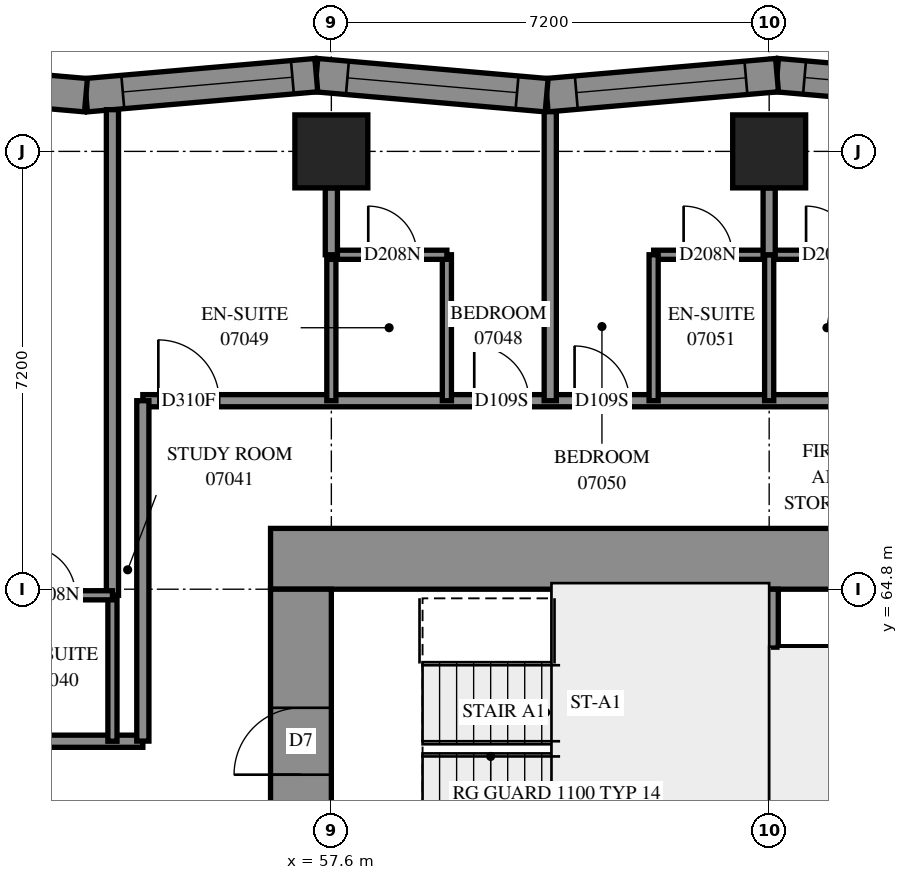
"""IFC4 building model, lengths in metres.
Left out: names, types, materials, properties, quantities, classifications, styles, units other than length and angle.
Written with IfcOpenShell. Run it as: python <this file> out.ifc"""

import sys

from ifc_helpers import new_model, si_unit, direction, frame, frame_2d, origin, origin_2d, place, context, subcontext, project, spatial, polyline, rectangle, outline, extrude, element, fill, save


model = new_model("IFC4")
c1 = context("Model", 3, precision=1e-05, world=origin(), true_north=direction((0.0, 1.0)))
c2 = subcontext(c1, "Body", "Model", "MODEL_VIEW")
j1 = project(units=[si_unit("LENGTHUNIT", "METRE"), si_unit("PLANEANGLEUNIT", "RADIAN")], contexts=[c1])
p1 = place(None, origin())
s1 = spatial("IfcSite", under=j1, at=p1, CompositionType="ELEMENT")
p2 = place(p1, origin())
s2 = spatial("IfcBuilding", under=s1, at=p2, CompositionType="ELEMENT")
p3 = place(p2, frame((0.0, 0.0, 30.4)))
s3 = spatial("IfcBuildingStorey", under=s2, at=p3, CompositionType="ELEMENT", Elevation=30.4)
for number, where, z_axis, x_axis in (
    (1, (57.6, 72.0, 0.0), (0.0, 0.0, 1.0), (1.0, 0.0, 0.0)),
    (2, (64.8, 72.0, 0.0), (0.0, 0.0, 1.0), (1.0, 0.0, 0.0)),
):
    element("IfcColumn", number, at=place(p3, frame(where, z_axis=z_axis, x_axis=x_axis)), inside=s3, PredefinedType="COLUMN", context=c2, shape_type="SweptSolid", body=[
        extrude(rectangle(XDim=1.2, YDim=1.2, at=origin_2d()), origin(), (0.0, 0.0, 1.0), 3.1),
    ])
p4 = place(p3, frame((56.6, 65.3, -0.3), z_axis=(0.0, 0.0, 1.0), x_axis=(1.0, 0.0, 0.0)))
e3 = element("IfcWall", 3, at=p4, inside=s3, PredefinedType="SHEAR", context=c2, shape_type="SweptSolid", body=[
    extrude(rectangle(XDim=16.4, YDim=1.0, at=frame_2d((8.2, 0.0))), origin(), (0.0, 0.0, 1.0), 2.7),
])
p5 = place(p4, frame((11.0, 0.0, 0.3)))
e4 = element("IfcOpeningElement", 4, at=p5, cuts=e3, PredefinedType="OPENING", context=c2, shape_type="SweptSolid", body=[
    extrude(rectangle(XDim=0.8, YDim=2.1, at=frame_2d((0.4, 1.05))), frame((0.0, 0.51, 0.0), z_axis=(0.0, -1.0, 0.0), x_axis=(1.0, 0.0, 0.0)), (0.0, 0.0, 1.0), 1.02),
])
p6 = place(p3, frame((57.1, 50.4, -0.3), z_axis=(0.0, 0.0, 1.0), x_axis=(0.0, 1.0, 0.0)))
e5 = element("IfcWall", 5, at=p6, inside=s3, PredefinedType="SHEAR", context=c2, shape_type="SweptSolid", body=[
    extrude(rectangle(XDim=14.4, YDim=1.0, at=frame_2d((7.2, 0.0))), origin(), (0.0, 0.0, 1.0), 2.7),
])
p7 = place(p6, frame((4.55, 0.0, 0.3)))
e6 = element("IfcOpeningElement", 6, at=p7, cuts=e5, PredefinedType="OPENING", context=c2, shape_type="SweptSolid", body=[
    extrude(rectangle(XDim=1.1, YDim=2.1, at=frame_2d((0.55, 1.05))), frame((0.0, 0.51, 0.0), z_axis=(0.0, -1.0, 0.0), x_axis=(1.0, 0.0, 0.0)), (0.0, 0.0, 1.0), 1.02),
])
p8 = place(p6, frame((11.35, 0.0, 0.3)))
e7 = element("IfcOpeningElement", 7, at=p8, cuts=e5, PredefinedType="OPENING", context=c2, shape_type="SweptSolid", body=[
    extrude(rectangle(XDim=1.1, YDim=2.1, at=frame_2d((0.55, 1.05))), frame((0.0, 0.51, 0.0), z_axis=(0.0, -1.0, 0.0), x_axis=(1.0, 0.0, 0.0)), (0.0, 0.0, 1.0), 1.02),
])
p9 = place(p3, frame((64.8, 60.6, 0.0), z_axis=(0.0, 0.0, 1.0), x_axis=(0.0, 1.0, 0.0)))
e8 = element("IfcWall", 8, at=p9, inside=s3, PredefinedType="SOLIDWALL", context=c2, shape_type="SweptSolid", body=[
    extrude(rectangle(XDim=4.2, YDim=0.3, at=frame_2d((2.1, 0.0))), origin(), (0.0, 0.0, 1.0), 3.1),
])
p10 = place(p3, frame((68.718, 72.924, 0.0), z_axis=(0.0, 0.0, 1.0), x_axis=(-0.9962273538, 0.0867816769, 0.0)))
e9 = element("IfcWall", 9, at=p10, inside=s3, PredefinedType="SOLIDWALL", context=c2, shape_type="SweptSolid", body=[
    extrude(outline(polyline([(0.024, -0.275), (3.827, -0.275), (3.779, 0.275), (-0.024, 0.275), (0.024, -0.275)])), origin(), (0.0, 0.0, 1.0), 3.1),
])
p11 = place(p10, frame((0.549, 0.0, 0.5)))
e10 = element("IfcOpeningElement", 10, at=p11, cuts=e9, PredefinedType="OPENING", context=c2, shape_type="SweptSolid", body=[
    extrude(rectangle(XDim=2.8, YDim=2.45, at=frame_2d((1.4, 1.225))), frame((0.0, 0.285, 0.0), z_axis=(0.0, -1.0, 0.0), x_axis=(1.0, 0.0, 0.0)), (0.0, 0.0, 1.0), 0.57),
])
p12 = place(p3, frame((64.929, 73.254, 0.0), z_axis=(0.0, 0.0, 1.0), x_axis=(-0.9962271558, -0.0867839505, 0.0)))
e11 = element("IfcWall", 11, at=p12, inside=s3, PredefinedType="SOLIDWALL", context=c2, shape_type="SweptSolid", body=[
    extrude(outline(polyline([(-0.024, -0.275), (3.779, -0.275), (3.827, 0.275), (0.024, 0.275), (-0.024, -0.275)])), origin(), (0.0, 0.0, 1.0), 3.1),
])
p13 = place(p12, frame((0.513, 0.0, 0.5)))
e12 = element("IfcOpeningElement", 12, at=p13, cuts=e11, PredefinedType="OPENING", context=c2, shape_type="SweptSolid", body=[
    extrude(rectangle(XDim=2.8, YDim=2.45, at=frame_2d((1.4, 1.225))), frame((0.0, 0.285, 0.0), z_axis=(0.0, -1.0, 0.0), x_axis=(1.0, 0.0, 0.0)), (0.0, 0.0, 1.0), 0.57),
])
p14 = place(p3, frame((61.141, 72.924, 0.0), z_axis=(0.0, 0.0, 1.0), x_axis=(-0.9962273538, 0.0867816769, 0.0)))
e13 = element("IfcWall", 13, at=p14, inside=s3, PredefinedType="SOLIDWALL", context=c2, shape_type="SweptSolid", body=[
    extrude(outline(polyline([(0.024, -0.275), (3.827, -0.275), (3.779, 0.275), (-0.024, 0.275), (0.024, -0.275)])), origin(), (0.0, 0.0, 1.0), 3.1),
])
p15 = place(p14, frame((0.489, 0.0, 0.5)))
e14 = element("IfcOpeningElement", 14, at=p15, cuts=e13, PredefinedType="OPENING", context=c2, shape_type="SweptSolid", body=[
    extrude(rectangle(XDim=2.8, YDim=2.45, at=frame_2d((1.4, 1.225))), frame((0.0, 0.285, 0.0), z_axis=(0.0, -1.0, 0.0), x_axis=(1.0, 0.0, 0.0)), (0.0, 0.0, 1.0), 0.57),
])
p16 = place(p3, frame((57.353, 73.254, 0.0), z_axis=(0.0, 0.0, 1.0), x_axis=(-0.9962273538, -0.0867816769, 0.0)))
e15 = element("IfcWall", 15, at=p16, inside=s3, PredefinedType="SOLIDWALL", context=c2, shape_type="SweptSolid", body=[
    extrude(outline(polyline([(-0.024, -0.275), (3.779, -0.275), (3.827, 0.275), (0.024, 0.275), (-0.024, -0.275)])), origin(), (0.0, 0.0, 1.0), 3.1),
])
p17 = place(p16, frame((0.395, 0.0, 0.5)))
e16 = element("IfcOpeningElement", 16, at=p17, cuts=e15, PredefinedType="OPENING", context=c2, shape_type="SweptSolid", body=[
    extrude(rectangle(XDim=2.8, YDim=2.45, at=frame_2d((1.4, 1.225))), frame((0.0, 0.285, 0.0), z_axis=(0.0, -1.0, 0.0), x_axis=(1.0, 0.0, 0.0)), (0.0, 0.0, 1.0), 0.57),
])
p18 = place(p3, frame((53.564, 72.924, 0.0), z_axis=(0.0, 0.0, 1.0), x_axis=(-0.9962271558, 0.0867839505, 0.0)))
e17 = element("IfcWall", 17, at=p18, inside=s3, PredefinedType="SOLIDWALL", context=c2, shape_type="SweptSolid", body=[
    extrude(outline(polyline([(0.024, -0.275), (3.827, -0.275), (3.779, 0.275), (-0.024, 0.275), (0.024, -0.275)])), origin(), (0.0, 0.0, 1.0), 3.1),
])
p19 = place(p18, frame((1.088, 0.0, 0.5)))
e18 = element("IfcOpeningElement", 18, at=p19, cuts=e17, PredefinedType="OPENING", context=c2, shape_type="SweptSolid", body=[
    extrude(rectangle(XDim=1.2, YDim=2.45, at=frame_2d((0.6, 1.225))), frame((0.0, 0.285, 0.0), z_axis=(0.0, -1.0, 0.0), x_axis=(1.0, 0.0, 0.0)), (0.0, 0.0, 1.0), 0.57),
])
p20 = place(p3, frame((64.95, 63.78, 0.0), z_axis=(0.0, 0.0, 1.0), x_axis=(1.0, 0.0, 0.0)))
e19 = element("IfcWall", 19, at=p20, inside=s3, PredefinedType="PARTITIONING", context=c2, shape_type="SweptSolid", body=[
    extrude(rectangle(XDim=6.25, YDim=0.15, at=frame_2d((3.125, 0.0))), origin(), (0.0, 0.0, 1.0), 3.1),
])
p21 = place(p3, frame((33.502, 62.3, 0.0), z_axis=(0.0, 0.0, 1.0), x_axis=(1.0, 0.0, 0.0)))
e20 = element("IfcWall", 20, at=p21, inside=s3, PredefinedType="PARTITIONING", context=c2, shape_type="SweptSolid", body=[
    extrude(rectangle(XDim=20.998, YDim=0.2, at=frame_2d((10.499, 0.0))), origin(), (0.0, 0.0, 1.0), 3.1),
])
p22 = place(p21, frame((2.898, 0.0, 0.0)))
e21 = element("IfcOpeningElement", 21, at=p22, cuts=e20, PredefinedType="OPENING", context=c2, shape_type="SweptSolid", body=[
    extrude(rectangle(XDim=0.9, YDim=2.1, at=frame_2d((0.45, 1.05))), frame((0.0, 0.11, 0.0), z_axis=(0.0, -1.0, 0.0), x_axis=(1.0, 0.0, 0.0)), (0.0, 0.0, 1.0), 0.22),
])
p23 = place(p21, frame((8.448, 0.0, 0.0)))
e22 = element("IfcOpeningElement", 22, at=p23, cuts=e20, PredefinedType="OPENING", context=c2, shape_type="SweptSolid", body=[
    extrude(rectangle(XDim=0.9, YDim=2.1, at=frame_2d((0.45, 1.05))), frame((0.0, 0.11, 0.0), z_axis=(0.0, -1.0, 0.0), x_axis=(1.0, 0.0, 0.0)), (0.0, 0.0, 1.0), 0.22),
])
p24 = place(p21, frame((10.098, 0.0, 0.0)))
e23 = element("IfcOpeningElement", 23, at=p24, cuts=e20, PredefinedType="OPENING", context=c2, shape_type="SweptSolid", body=[
    extrude(rectangle(XDim=0.9, YDim=2.1, at=frame_2d((0.45, 1.05))), frame((0.0, 0.11, 0.0), z_axis=(0.0, -1.0, 0.0), x_axis=(1.0, 0.0, 0.0)), (0.0, 0.0, 1.0), 0.22),
])
p25 = place(p21, frame((15.648, 0.0, 0.0)))
e24 = element("IfcOpeningElement", 24, at=p25, cuts=e20, PredefinedType="OPENING", context=c2, shape_type="SweptSolid", body=[
    extrude(rectangle(XDim=0.9, YDim=2.1, at=frame_2d((0.45, 1.05))), frame((0.0, 0.11, 0.0), z_axis=(0.0, -1.0, 0.0), x_axis=(1.0, 0.0, 0.0)), (0.0, 0.0, 1.0), 0.22),
])
p26 = place(p21, frame((17.298, 0.0, 0.0)))
e25 = element("IfcOpeningElement", 25, at=p26, cuts=e20, PredefinedType="OPENING", context=c2, shape_type="SweptSolid", body=[
    extrude(rectangle(XDim=0.9, YDim=2.1, at=frame_2d((0.45, 1.05))), frame((0.0, 0.11, 0.0), z_axis=(0.0, -1.0, 0.0), x_axis=(1.0, 0.0, 0.0)), (0.0, 0.0, 1.0), 0.22),
])
p27 = place(p3, frame((54.5, 67.9, 0.0), z_axis=(0.0, 0.0, 1.0), x_axis=(1.0, 0.0, 0.0)))
e26 = element("IfcWall", 26, at=p27, inside=s3, PredefinedType="PARTITIONING", context=c2, shape_type="SweptSolid", body=[
    extrude(rectangle(XDim=20.6, YDim=0.2, at=frame_2d((10.3, 0.0))), origin(), (0.0, 0.0, 1.0), 3.1),
])
p28 = place(p27, frame((0.255, 0.0, 0.0)))
e27 = element("IfcOpeningElement", 27, at=p28, cuts=e26, PredefinedType="OPENING", context=c2, shape_type="SweptSolid", body=[
    extrude(rectangle(XDim=1.0, YDim=2.1, at=frame_2d((0.5, 1.05))), frame((0.0, 0.11, 0.0), z_axis=(0.0, -1.0, 0.0), x_axis=(1.0, 0.0, 0.0)), (0.0, 0.0, 1.0), 0.22),
])
p29 = place(p27, frame((19.345, 0.0, 0.0)))
e28 = element("IfcOpeningElement", 28, at=p29, cuts=e26, PredefinedType="OPENING", context=c2, shape_type="SweptSolid", body=[
    extrude(rectangle(XDim=1.0, YDim=2.1, at=frame_2d((0.5, 1.05))), frame((0.0, 0.11, 0.0), z_axis=(0.0, -1.0, 0.0), x_axis=(1.0, 0.0, 0.0)), (0.0, 0.0, 1.0), 0.22),
])
p30 = place(p27, frame((5.45, 0.0, 0.0)))
e29 = element("IfcOpeningElement", 29, at=p30, cuts=e26, PredefinedType="OPENING", context=c2, shape_type="SweptSolid", body=[
    extrude(rectangle(XDim=0.9, YDim=2.1, at=frame_2d((0.45, 1.05))), frame((0.0, 0.11, 0.0), z_axis=(0.0, -1.0, 0.0), x_axis=(1.0, 0.0, 0.0)), (0.0, 0.0, 1.0), 0.22),
])
p31 = place(p27, frame((7.1, 0.0, 0.0)))
e30 = element("IfcOpeningElement", 30, at=p31, cuts=e26, PredefinedType="OPENING", context=c2, shape_type="SweptSolid", body=[
    extrude(rectangle(XDim=0.9, YDim=2.1, at=frame_2d((0.45, 1.05))), frame((0.0, 0.11, 0.0), z_axis=(0.0, -1.0, 0.0), x_axis=(1.0, 0.0, 0.0)), (0.0, 0.0, 1.0), 0.22),
])
p32 = place(p27, frame((12.65, 0.0, 0.0)))
e31 = element("IfcOpeningElement", 31, at=p32, cuts=e26, PredefinedType="OPENING", context=c2, shape_type="SweptSolid", body=[
    extrude(rectangle(XDim=0.9, YDim=2.1, at=frame_2d((0.45, 1.05))), frame((0.0, 0.11, 0.0), z_axis=(0.0, -1.0, 0.0), x_axis=(1.0, 0.0, 0.0)), (0.0, 0.0, 1.0), 0.22),
])
p33 = place(p27, frame((14.3, 0.0, 0.0)))
e32 = element("IfcOpeningElement", 32, at=p33, cuts=e26, PredefinedType="OPENING", context=c2, shape_type="SweptSolid", body=[
    extrude(rectangle(XDim=0.9, YDim=2.1, at=frame_2d((0.45, 1.05))), frame((0.0, 0.11, 0.0), z_axis=(0.0, -1.0, 0.0), x_axis=(1.0, 0.0, 0.0)), (0.0, 0.0, 1.0), 0.22),
])
p34 = place(p3, frame((54.0, 64.7, 0.0), z_axis=(0.0, 0.0, 1.0), x_axis=(0.0, 1.0, 0.0)))
e33 = element("IfcWall", 33, at=p34, inside=s3, PredefinedType="PARTITIONING", context=c2, shape_type="SweptSolid", body=[
    extrude(rectangle(XDim=7.986, YDim=0.2, at=frame_2d((3.993, 0.0))), origin(), (0.0, 0.0, 1.0), 3.1),
])
p35 = place(p3, frame((54.5, 62.302, 0.0), z_axis=(0.0, 0.0, 1.0), x_axis=(0.0, 1.0, 0.0)))
e34 = element("IfcWall", 34, at=p35, inside=s3, PredefinedType="PARTITIONING", context=c2, shape_type="SweptSolid", body=[
    extrude(rectangle(XDim=5.598, YDim=0.2, at=frame_2d((2.799, 0.0))), origin(), (0.0, 0.0, 1.0), 3.1),
])
p36 = place(p3, frame((61.2, 67.9, 0.0), z_axis=(0.0, 0.0, 1.0), x_axis=(0.0, 1.0, 0.0)))
e35 = element("IfcWall", 35, at=p36, inside=s3, PredefinedType="PARTITIONING", context=c2, shape_type="SweptSolid", body=[
    extrude(rectangle(XDim=4.753, YDim=0.2, at=frame_2d((2.377, 0.0))), origin(), (0.0, 0.0, 1.0), 3.1),
])
p37 = place(p3, frame((62.9, 70.3, 0.0), z_axis=(0.0, 0.0, 1.0), x_axis=(1.0, 0.0, 0.0)))
e36 = element("IfcWall", 36, at=p37, inside=s3, PredefinedType="PARTITIONING", context=c2, shape_type="SweptSolid", body=[
    extrude(rectangle(XDim=3.8, YDim=0.15, at=frame_2d((1.9, 0.0))), origin(), (0.0, 0.0, 1.0), 3.1),
])
p38 = place(p37, frame((0.493, 0.0, 0.0)))
e37 = element("IfcOpeningElement", 37, at=p38, cuts=e36, PredefinedType="OPENING", context=c2, shape_type="SweptSolid", body=[
    extrude(rectangle(XDim=0.8, YDim=2.1, at=frame_2d((0.4, 1.05))), frame((0.0, 0.085, 0.0), z_axis=(0.0, -1.0, 0.0), x_axis=(1.0, 0.0, 0.0)), (0.0, 0.0, 1.0), 0.17),
])
p39 = place(p37, frame((2.507, 0.0, 0.0)))
e38 = element("IfcOpeningElement", 38, at=p39, cuts=e36, PredefinedType="OPENING", context=c2, shape_type="SweptSolid", body=[
    extrude(rectangle(XDim=0.8, YDim=2.1, at=frame_2d((0.4, 1.05))), frame((0.0, 0.085, 0.0), z_axis=(0.0, -1.0, 0.0), x_axis=(1.0, 0.0, 0.0)), (0.0, 0.0, 1.0), 0.17),
])
for number, where, z_axis, x_axis in (
    (39, (54.0, 62.3, 0.0), (0.0, 0.0, 1.0), (0.0, 1.0, 0.0)),
    (40, (59.5, 67.9, 0.0), (0.0, 0.0, 1.0), (0.0, 1.0, 0.0)),
    (41, (57.6, 67.9, 0.0), (0.0, 0.0, 1.0), (0.0, 1.0, 0.0)),
    (42, (62.9, 67.9, 0.0), (0.0, 0.0, 1.0), (0.0, 1.0, 0.0)),
    (43, (64.8, 67.9, 0.0), (0.0, 0.0, 1.0), (0.0, 1.0, 0.0)),
):
    element("IfcWall", number, at=place(p3, frame(where, z_axis=z_axis, x_axis=x_axis)), inside=s3, PredefinedType="PARTITIONING", context=c2, shape_type="SweptSolid", body=[
        extrude(rectangle(XDim=2.4, YDim=0.15, at=frame_2d((1.2, 0.0))), origin(), (0.0, 0.0, 1.0), 3.1),
    ])
p40 = place(p3, frame((52.1, 64.7, 0.0), z_axis=(0.0, 0.0, 1.0), x_axis=(1.0, 0.0, 0.0)))
e44 = element("IfcWall", 44, at=p40, inside=s3, PredefinedType="PARTITIONING", context=c2, shape_type="SweptSolid", body=[
    extrude(rectangle(XDim=1.9, YDim=0.15, at=frame_2d((0.95, 0.0))), origin(), (0.0, 0.0, 1.0), 3.1),
])
p41 = place(p40, frame((0.493, 0.0, 0.0)))
e45 = element("IfcOpeningElement", 45, at=p41, cuts=e44, PredefinedType="OPENING", context=c2, shape_type="SweptSolid", body=[
    extrude(rectangle(XDim=0.8, YDim=2.1, at=frame_2d((0.4, 1.05))), frame((0.0, 0.085, 0.0), z_axis=(0.0, -1.0, 0.0), x_axis=(1.0, 0.0, 0.0)), (0.0, 0.0, 1.0), 0.17),
])
p42 = place(p3, frame((57.6, 70.3, 0.0), z_axis=(0.0, 0.0, 1.0), x_axis=(1.0, 0.0, 0.0)))
e46 = element("IfcWall", 46, at=p42, inside=s3, PredefinedType="PARTITIONING", context=c2, shape_type="SweptSolid", body=[
    extrude(rectangle(XDim=1.9, YDim=0.15, at=frame_2d((0.95, 0.0))), origin(), (0.0, 0.0, 1.0), 3.1),
])
p43 = place(p42, frame((0.607, 0.0, 0.0)))
e47 = element("IfcOpeningElement", 47, at=p43, cuts=e46, PredefinedType="OPENING", context=c2, shape_type="SweptSolid", body=[
    extrude(rectangle(XDim=0.8, YDim=2.1, at=frame_2d((0.4, 1.05))), frame((0.0, 0.085, 0.0), z_axis=(0.0, -1.0, 0.0), x_axis=(1.0, 0.0, 0.0)), (0.0, 0.0, 1.0), 0.17),
])
for number, where, z_axis, x_axis in (
    (48, (57.6, 70.3, 0.0), (0.0, 0.0, 1.0), (0.0, 1.0, 0.0)),
    (49, (64.8, 70.3, 0.0), (0.0, 0.0, 1.0), (0.0, 1.0, 0.0)),
):
    element("IfcWall", number, at=place(p3, frame(where, z_axis=z_axis, x_axis=x_axis)), inside=s3, PredefinedType="PARTITIONING", context=c2, shape_type="SweptSolid", body=[
        extrude(rectangle(XDim=1.1, YDim=0.2, at=frame_2d((0.55, 0.0))), origin(), (0.0, 0.0, 1.0), 3.1),
    ])
p44 = place(p11, origin())
e50 = element("IfcWindow", 50, at=p44, inside=s3, PartitioningType="SINGLE_PANEL", PredefinedType="WINDOW", context=c2, shape_type="SweptSolid", body=[
    extrude(rectangle(XDim=2.8, YDim=2.45, at=frame_2d((1.4, 1.225))), frame((0.0, 0.155, 0.0), z_axis=(0.0, -1.0, 0.0), x_axis=(1.0, 0.0, 0.0)), (0.0, 0.0, 1.0), 0.06),
])
fill(e10, e50)
p45 = place(p13, origin())
e51 = element("IfcWindow", 51, at=p45, inside=s3, PartitioningType="SINGLE_PANEL", PredefinedType="WINDOW", context=c2, shape_type="SweptSolid", body=[
    extrude(rectangle(XDim=2.8, YDim=2.45, at=frame_2d((1.4, 1.225))), frame((0.0, 0.155, 0.0), z_axis=(0.0, -1.0, 0.0), x_axis=(1.0, 0.0, 0.0)), (0.0, 0.0, 1.0), 0.06),
])
fill(e12, e51)
p46 = place(p15, origin())
e52 = element("IfcWindow", 52, at=p46, inside=s3, PartitioningType="SINGLE_PANEL", PredefinedType="WINDOW", context=c2, shape_type="SweptSolid", body=[
    extrude(rectangle(XDim=2.8, YDim=2.45, at=frame_2d((1.4, 1.225))), frame((0.0, 0.155, 0.0), z_axis=(0.0, -1.0, 0.0), x_axis=(1.0, 0.0, 0.0)), (0.0, 0.0, 1.0), 0.06),
])
fill(e14, e52)
p47 = place(p17, origin())
e53 = element("IfcWindow", 53, at=p47, inside=s3, PartitioningType="SINGLE_PANEL", PredefinedType="WINDOW", context=c2, shape_type="SweptSolid", body=[
    extrude(rectangle(XDim=2.8, YDim=2.45, at=frame_2d((1.4, 1.225))), frame((0.0, 0.155, 0.0), z_axis=(0.0, -1.0, 0.0), x_axis=(1.0, 0.0, 0.0)), (0.0, 0.0, 1.0), 0.06),
])
fill(e16, e53)
p48 = place(p8, origin())
e54 = element("IfcDoor", 54, at=p48, inside=s3, OperationType="SINGLE_SWING_LEFT", PredefinedType="DOOR", context=c2, shape_type="SweptSolid", body=[
    extrude(rectangle(XDim=1.1, YDim=2.1, at=frame_2d((0.55, 1.05))), frame((0.0, 0.025, 0.0), z_axis=(0.0, -1.0, 0.0), x_axis=(1.0, 0.0, 0.0)), (0.0, 0.0, 1.0), 0.05),
])
fill(e7, e54)
p49 = place(p41, origin())
e55 = element("IfcDoor", 55, at=p49, inside=s3, OperationType="SINGLE_SWING_RIGHT", PredefinedType="DOOR", context=c2, shape_type="SweptSolid", body=[
    extrude(rectangle(XDim=0.8, YDim=2.1, at=frame_2d((0.4, 1.05))), frame((0.0, 0.025, 0.0), z_axis=(0.0, -1.0, 0.0), x_axis=(1.0, 0.0, 0.0)), (0.0, 0.0, 1.0), 0.05),
])
fill(e45, e55)
p50 = place(p28, origin())
e56 = element("IfcDoor", 56, at=p50, inside=s3, OperationType="SINGLE_SWING_LEFT", PredefinedType="DOOR", context=c2, shape_type="SweptSolid", body=[
    extrude(rectangle(XDim=1.0, YDim=2.1, at=frame_2d((0.5, 1.05))), frame((0.0, 0.025, 0.0), z_axis=(0.0, -1.0, 0.0), x_axis=(1.0, 0.0, 0.0)), (0.0, 0.0, 1.0), 0.05),
])
fill(e27, e56)
p51 = place(p30, origin())
e57 = element("IfcDoor", 57, at=p51, inside=s3, OperationType="SINGLE_SWING_RIGHT", PredefinedType="DOOR", context=c2, shape_type="SweptSolid", body=[
    extrude(rectangle(XDim=0.9, YDim=2.1, at=frame_2d((0.45, 1.05))), frame((0.0, 0.025, 0.0), z_axis=(0.0, -1.0, 0.0), x_axis=(1.0, 0.0, 0.0)), (0.0, 0.0, 1.0), 0.05),
])
fill(e29, e57)
p52 = place(p43, origin())
e58 = element("IfcDoor", 58, at=p52, inside=s3, OperationType="SINGLE_SWING_RIGHT", PredefinedType="DOOR", context=c2, shape_type="SweptSolid", body=[
    extrude(rectangle(XDim=0.8, YDim=2.1, at=frame_2d((0.4, 1.05))), frame((0.0, 0.025, 0.0), z_axis=(0.0, -1.0, 0.0), x_axis=(1.0, 0.0, 0.0)), (0.0, 0.0, 1.0), 0.05),
])
fill(e47, e58)
p53 = place(p31, origin())
e59 = element("IfcDoor", 59, at=p53, inside=s3, OperationType="SINGLE_SWING_LEFT", PredefinedType="DOOR", context=c2, shape_type="SweptSolid", body=[
    extrude(rectangle(XDim=0.9, YDim=2.1, at=frame_2d((0.45, 1.05))), frame((0.0, 0.025, 0.0), z_axis=(0.0, -1.0, 0.0), x_axis=(1.0, 0.0, 0.0)), (0.0, 0.0, 1.0), 0.05),
])
fill(e30, e59)
p54 = place(p38, origin())
e60 = element("IfcDoor", 60, at=p54, inside=s3, OperationType="SINGLE_SWING_RIGHT", PredefinedType="DOOR", context=c2, shape_type="SweptSolid", body=[
    extrude(rectangle(XDim=0.8, YDim=2.1, at=frame_2d((0.4, 1.05))), frame((0.0, 0.025, 0.0), z_axis=(0.0, -1.0, 0.0), x_axis=(1.0, 0.0, 0.0)), (0.0, 0.0, 1.0), 0.05),
])
fill(e37, e60)
p55 = place(p39, origin())
e61 = element("IfcDoor", 61, at=p55, inside=s3, OperationType="SINGLE_SWING_RIGHT", PredefinedType="DOOR", context=c2, shape_type="SweptSolid", body=[
    extrude(rectangle(XDim=0.8, YDim=2.1, at=frame_2d((0.4, 1.05))), frame((0.0, 0.025, 0.0), z_axis=(0.0, -1.0, 0.0), x_axis=(1.0, 0.0, 0.0)), (0.0, 0.0, 1.0), 0.05),
])
fill(e38, e61)
save(model, sys.argv[1])
